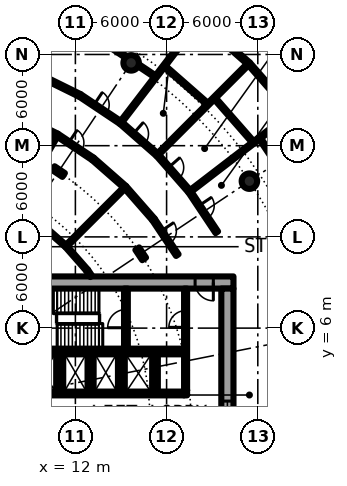
"""IFC4 building model, lengths in metres.
Left out: names, types, materials, properties, quantities, classifications, styles, units other than length and angle.
Written with IfcOpenShell. Run it as: python <this file> out.ifc"""

import sys

from ifc_helpers import new_model, si_unit, direction, frame, frame_2d, origin, origin_2d, place, context, subcontext, project, spatial, rectangle, hollow_circle, i_section, extrude, element, fill, save


model = new_model("IFC4")
c1 = context("Model", 3, precision=1e-05, world=origin(), true_north=direction((0.0, 1.0)))
c2 = subcontext(c1, "Body", "Model", "MODEL_VIEW")
j1 = project(units=[si_unit("LENGTHUNIT", "METRE"), si_unit("PLANEANGLEUNIT", "RADIAN")], contexts=[c1])
p1 = place(None, origin())
s1 = spatial("IfcSite", under=j1, at=p1, CompositionType="ELEMENT")
p2 = place(p1, origin())
s2 = spatial("IfcBuilding", under=s1, at=p2, CompositionType="ELEMENT")
p3 = place(p2, frame((0.0, 0.0, 5.4)))
s3 = spatial("IfcBuildingStorey", under=s2, at=p3, CompositionType="ELEMENT", Elevation=5.4)
for number, where, z_axis, x_axis in (
    (1, (23.448, 15.667, 0.0), (0.0, 0.0, 1.0), (1.0, 0.0, 0.0)),
    (2, (15.667, 23.448, 0.0), (0.0, 0.0, 1.0), (1.0, 0.0, 0.0)),
):
    element("IfcColumn", number, at=place(p3, frame(where, z_axis=z_axis, x_axis=x_axis)), inside=s3, PredefinedType="COLUMN", context=c2, shape_type="SweptSolid", body=[
        extrude(hollow_circle(Radius=0.508, WallThickness=0.05, at=origin_2d()), origin(), (0.0, 0.0, 1.0), 4.2),
    ])
for number, where, z_axis, x_axis in (
    (3, (16.297, 10.889, 0.0), (0.0, 0.0, 1.0), (0.831, 0.556, 0.0)),
    (4, (10.889, 16.297, 0.0), (0.0, 0.0, 1.0), (0.556, 0.831, 0.0)),
):
    element("IfcColumn", number, at=place(p3, frame(where, z_axis=z_axis, x_axis=x_axis)), inside=s3, PredefinedType="COLUMN", context=c2, shape_type="SweptSolid", body=[
        extrude(i_section(OverallWidth=0.303, OverallDepth=0.814, WebThickness=0.021, FlangeThickness=0.04, FilletRadius=0.03, at=origin_2d()), origin(), (0.0, 0.0, 1.0), 4.2),
    ])
p4 = place(p3, frame((22.4, 9.0, 0.0), z_axis=(0.0, 0.0, 1.0), x_axis=(-1.0, 0.0, 0.0)))
e5 = element("IfcWall", 5, at=p4, inside=s3, PredefinedType="SHEAR", context=c2, shape_type="SweptSolid", body=[
    extrude(rectangle(XDim=14.2, YDim=0.8, at=frame_2d((7.1, 0.0))), origin(), (0.0, 0.0, 1.0), 4.2),
])
p5 = place(p4, frame((1.325, 0.0, 0.0)))
e6 = element("IfcOpeningElement", 6, at=p5, cuts=e5, PredefinedType="OPENING", context=c2, shape_type="SweptSolid", body=[
    extrude(rectangle(XDim=1.2, YDim=2.3, at=frame_2d((0.6, 1.15))), frame((0.0, 0.41, 0.0), z_axis=(0.0, -1.0, 0.0), x_axis=(1.0, 0.0, 0.0)), (0.0, 0.0, 1.0), 0.82),
])
p6 = place(p3, frame((22.0, -8.6, 0.0), z_axis=(0.0, 0.0, 1.0), x_axis=(0.0, 1.0, 0.0)))
e7 = element("IfcWall", 7, at=p6, inside=s3, PredefinedType="SHEAR", context=c2, shape_type="SweptSolid", body=[
    extrude(rectangle(XDim=17.2, YDim=0.8, at=frame_2d((8.6, 0.0))), origin(), (0.0, 0.0, 1.0), 4.2),
])
p7 = place(p6, frame((7.4, 0.0, 0.1)))
e8 = element("IfcOpeningElement", 8, at=p7, cuts=e7, PredefinedType="OPENING", context=c2, shape_type="SweptSolid", body=[
    extrude(rectangle(XDim=2.4, YDim=2.2, at=frame_2d((1.2, 1.1))), frame((0.0, 0.41, 0.0), z_axis=(0.0, -1.0, 0.0), x_axis=(1.0, 0.0, 0.0)), (0.0, 0.0, 1.0), 0.82),
])
p8 = place(p3, frame((9.0, 1.7, 0.0), z_axis=(0.0, 0.0, 1.0), x_axis=(1.0, 0.0, 0.0)))
e9 = element("IfcWall", 9, at=p8, inside=s3, PredefinedType="SHEAR", context=c2, shape_type="SweptSolid", body=[
    extrude(rectangle(XDim=10.15, YDim=0.25, at=frame_2d((5.075, 0.0))), origin(), (0.0, 0.0, 1.0), 4.2),
])
p9 = place(p8, frame((0.387, 0.0, 0.0)))
e10 = element("IfcOpeningElement", 10, at=p9, cuts=e9, PredefinedType="OPENING", context=c2, shape_type="SweptSolid", body=[
    extrude(rectangle(XDim=1.1, YDim=2.3, at=frame_2d((0.55, 1.15))), frame((0.0, 0.135, 0.0), z_axis=(0.0, -1.0, 0.0), x_axis=(1.0, 0.0, 0.0)), (0.0, 0.0, 1.0), 0.27),
])
p10 = place(p8, frame((2.45, 0.0, 0.0)))
e11 = element("IfcOpeningElement", 11, at=p10, cuts=e9, PredefinedType="OPENING", context=c2, shape_type="SweptSolid", body=[
    extrude(rectangle(XDim=1.1, YDim=2.3, at=frame_2d((0.55, 1.15))), frame((0.0, 0.135, 0.0), z_axis=(0.0, -1.0, 0.0), x_axis=(1.0, 0.0, 0.0)), (0.0, 0.0, 1.0), 0.27),
])
p11 = place(p8, frame((4.45, 0.0, 0.0)))
e12 = element("IfcOpeningElement", 12, at=p11, cuts=e9, PredefinedType="OPENING", context=c2, shape_type="SweptSolid", body=[
    extrude(rectangle(XDim=1.1, YDim=2.3, at=frame_2d((0.55, 1.15))), frame((0.0, 0.135, 0.0), z_axis=(0.0, -1.0, 0.0), x_axis=(1.0, 0.0, 0.0)), (0.0, 0.0, 1.0), 0.27),
])
p12 = place(p3, frame((9.0, 4.462, 0.0), z_axis=(0.0, 0.0, 1.0), x_axis=(1.0, 0.0, 0.0)))
e13 = element("IfcWall", 13, at=p12, inside=s3, PredefinedType="SHEAR", context=c2, shape_type="SweptSolid", body=[
    extrude(rectangle(XDim=10.15, YDim=0.375, at=frame_2d((5.075, 0.0))), origin(), (0.0, 0.0, 1.0), 4.2),
])
p13 = place(p12, frame((6.6, 0.0, 0.0)))
e14 = element("IfcOpeningElement", 14, at=p13, cuts=e13, PredefinedType="OPENING", context=c2, shape_type="SweptSolid", body=[
    extrude(rectangle(XDim=1.1, YDim=2.3, at=frame_2d((0.55, 1.15))), frame((0.0, 0.198, 0.0), z_axis=(0.0, -1.0, 0.0), x_axis=(1.0, 0.0, 0.0)), (0.0, 0.0, 1.0), 0.395),
])
p14 = place(p3, frame((15.325, 4.65, 0.0), z_axis=(0.0, 0.0, 1.0), x_axis=(0.0, 1.0, 0.0)))
e15 = element("IfcWall", 15, at=p14, inside=s3, PredefinedType="SHEAR", context=c2, shape_type="SweptSolid", body=[
    extrude(rectangle(XDim=3.95, YDim=0.25, at=frame_2d((1.975, 0.0))), origin(), (0.0, 0.0, 1.0), 4.2),
])
p15 = place(p14, frame((1.375, 0.0, 0.0)))
e16 = element("IfcOpeningElement", 16, at=p15, cuts=e15, PredefinedType="OPENING", context=c2, shape_type="SweptSolid", body=[
    extrude(rectangle(XDim=1.2, YDim=2.3, at=frame_2d((0.6, 1.15))), frame((0.0, 0.135, 0.0), z_axis=(0.0, -1.0, 0.0), x_axis=(1.0, 0.0, 0.0)), (0.0, 0.0, 1.0), 0.27),
])
for number, where, z_axis, x_axis in (
    (17, (15.0, 1.825, 0.0), (0.0, 0.0, 1.0), (0.0, 1.0, 0.0)),
    (18, (17.3, 1.825, 0.0), (0.0, 0.0, 1.0), (0.0, 1.0, 0.0)),
):
    element("IfcWall", number, at=place(p3, frame(where, z_axis=z_axis, x_axis=x_axis)), inside=s3, PredefinedType="SOLIDWALL", context=c2, shape_type="SweptSolid", body=[
        extrude(rectangle(XDim=2.45, YDim=0.25, at=frame_2d((1.225, 0.0))), origin(), (0.0, 0.0, 1.0), 3.7),
    ])
p16 = place(p3, frame((19.25, 1.575, 0.0), z_axis=(0.0, 0.0, 1.0), x_axis=(0.0, 1.0, 0.0)))
e19 = element("IfcWall", 19, at=p16, inside=s3, PredefinedType="SOLIDWALL", context=c2, shape_type="SweptSolid", body=[
    extrude(rectangle(XDim=7.025, YDim=0.2, at=frame_2d((3.513, 0.0))), origin(), (0.0, 0.0, 1.0), 3.7),
])
p17 = place(p16, frame((4.475, 0.0, 0.0)))
e20 = element("IfcOpeningElement", 20, at=p17, cuts=e19, PredefinedType="OPENING", context=c2, shape_type="SweptSolid", body=[
    extrude(rectangle(XDim=1.1, YDim=2.3, at=frame_2d((0.55, 1.15))), frame((0.0, 0.11, 0.0), z_axis=(0.0, -1.0, 0.0), x_axis=(1.0, 0.0, 0.0)), (0.0, 0.0, 1.0), 0.22),
])
for number, where, z_axis, x_axis in (
    (21, (11.0, 1.825, 0.0), (0.0, 0.0, 1.0), (0.0, 1.0, 0.0)),
    (22, (13.0, 1.825, 0.0), (0.0, 0.0, 1.0), (0.0, 1.0, 0.0)),
):
    element("IfcWall", number, at=place(p3, frame(where, z_axis=z_axis, x_axis=x_axis)), inside=s3, PredefinedType="SOLIDWALL", context=c2, shape_type="SweptSolid", body=[
        extrude(rectangle(XDim=2.45, YDim=0.25, at=frame_2d((1.225, 0.0))), origin(), (0.0, 0.0, 1.0), 3.7),
    ])
p18 = place(p3, frame((8.051, 13.942, 0.0), z_axis=(0.0, 0.0, 1.0), x_axis=(0.499996545922, 0.866027397988, 0.0)))
e23 = element("IfcWall", 23, at=p18, inside=s3, PredefinedType="PARTITIONING", context=c2, shape_type="SweptSolid", body=[
    extrude(rectangle(XDim=5.5, YDim=0.15, at=frame_2d((2.75, 0.0))), origin(), (0.0, 0.0, 1.0), 3.7),
])
p19 = place(p3, frame((9.414, 22.727, 0.0), z_axis=(0.0, 0.0, 1.0), x_axis=(0.38259533032, 0.923916020652, 0.0)))
e24 = element("IfcWall", 24, at=p19, inside=s3, PredefinedType="PARTITIONING", context=c2, shape_type="SweptSolid", body=[
    extrude(rectangle(XDim=8.5, YDim=0.15, at=frame_2d((4.25, 0.0))), origin(), (0.0, 0.0, 1.0), 3.7),
])
p20 = place(p3, frame((11.384, 11.384, 0.0), z_axis=(0.0, 0.0, 1.0), x_axis=(0.707106781187, 0.707106781187, 0.0)))
e25 = element("IfcWall", 25, at=p20, inside=s3, PredefinedType="PARTITIONING", context=c2, shape_type="SweptSolid", body=[
    extrude(rectangle(XDim=5.501, YDim=0.15, at=frame_2d((2.75, 0.0))), origin(), (0.0, 0.0, 1.0), 3.7),
])
p21 = place(p3, frame((14.976, 19.516, 0.0), z_axis=(0.0, 0.0, 1.0), x_axis=(0.608691402198, 0.793407068843, 0.0)))
e26 = element("IfcWall", 26, at=p21, inside=s3, PredefinedType="PARTITIONING", context=c2, shape_type="SweptSolid", body=[
    extrude(rectangle(XDim=8.5, YDim=0.15, at=frame_2d((4.25, 0.0))), origin(), (0.0, 0.0, 1.0), 3.7),
])
p22 = place(p3, frame((17.395, 17.395, 0.0), z_axis=(0.0, 0.0, 1.0), x_axis=(0.707106781187, 0.707106781187, 0.0)))
e27 = element("IfcWall", 27, at=p22, inside=s3, PredefinedType="PARTITIONING", context=c2, shape_type="SweptSolid", body=[
    extrude(rectangle(XDim=8.5, YDim=0.15, at=frame_2d((4.25, 0.0))), origin(), (0.0, 0.0, 1.0), 3.7),
])
p23 = place(p3, frame((19.517, 14.975, 0.0), z_axis=(0.0, 0.0, 1.0), x_axis=(0.793309003466, 0.608819205528, 0.0)))
e28 = element("IfcWall", 28, at=p23, inside=s3, PredefinedType="PARTITIONING", context=c2, shape_type="SweptSolid", body=[
    extrude(rectangle(XDim=8.5, YDim=0.15, at=frame_2d((4.25, 0.0))), origin(), (0.0, 0.0, 1.0), 3.7),
])
for number, where, z_axis, x_axis in (
    (29, (9.801, 12.773, 0.0), (0.0, 0.0, 1.0), (0.752, -0.66, 0.0)),
    (30, (11.384, 11.384, 0.0), (0.0, 0.0, 1.0), (0.66, -0.752, 0.0)),
):
    element("IfcWall", number, at=place(p3, frame(where, z_axis=z_axis, x_axis=x_axis)), inside=s3, PredefinedType="PARTITIONING", context=c2, shape_type="SweptSolid", body=[
        extrude(rectangle(XDim=2.106, YDim=0.15, at=frame_2d((1.053, 0.0))), origin(), (0.0, 0.0, 1.0), 3.7),
    ])
p24 = place(p3, frame((12.773, 9.801, 0.0), z_axis=(0.0, 0.0, 1.0), x_axis=(0.555634077892, -0.831426948977, 0.0)))
e31 = element("IfcWall", 31, at=p24, inside=s3, PredefinedType="PARTITIONING", context=c2, shape_type="SweptSolid", body=[
    extrude(rectangle(XDim=0.482, YDim=0.15, at=frame_2d((0.241, 0.0))), origin(), (0.0, 0.0, 1.0), 3.7),
])
p25 = place(p3, frame((8.266, 19.956, 0.0), z_axis=(0.0, 0.0, 1.0), x_axis=(0.896816398134, -0.442402924988, 0.0)))
e32 = element("IfcWall", 32, at=p25, inside=s3, PredefinedType="PARTITIONING", context=c2, shape_type="SweptSolid", body=[
    extrude(rectangle(XDim=2.825, YDim=0.2, at=frame_2d((1.413, 0.0))), origin(), (0.0, 0.0, 1.0), 3.7),
])
p26 = place(p3, frame((10.8, 18.706, 0.0), z_axis=(0.0, 0.0, 1.0), x_axis=(0.831371669473, -0.55571678686, 0.0)))
e33 = element("IfcWall", 33, at=p26, inside=s3, PredefinedType="PARTITIONING", context=c2, shape_type="SweptSolid", body=[
    extrude(rectangle(XDim=2.825, YDim=0.2, at=frame_2d((1.413, 0.0))), origin(), (0.0, 0.0, 1.0), 3.7),
])
p27 = place(p26, frame((0.913, 0.0, 0.0)))
e34 = element("IfcOpeningElement", 34, at=p27, cuts=e33, PredefinedType="OPENING", context=c2, shape_type="SweptSolid", body=[
    extrude(rectangle(XDim=1.0, YDim=2.3, at=frame_2d((0.5, 1.15))), frame((0.0, 0.11, 0.0), z_axis=(0.0, -1.0, 0.0), x_axis=(1.0, 0.0, 0.0)), (0.0, 0.0, 1.0), 0.22),
])
for number, where, z_axis, x_axis in (
    (35, (13.149, 17.136, 0.0), (0.0, 0.0, 1.0), (0.752, -0.659, 0.0)),
    (36, (15.274, 15.274, 0.0), (0.0, 0.0, 1.0), (0.659, -0.752, 0.0)),
):
    element("IfcWall", number, at=place(p3, frame(where, z_axis=z_axis, x_axis=x_axis)), inside=s3, PredefinedType="PARTITIONING", context=c2, shape_type="SweptSolid", body=[
        extrude(rectangle(XDim=2.825, YDim=0.2, at=frame_2d((1.413, 0.0))), origin(), (0.0, 0.0, 1.0), 3.7),
    ])
p28 = place(p3, frame((17.136, 13.149, 0.0), z_axis=(0.0, 0.0, 1.0), x_axis=(0.55571678686, -0.831371669473, 0.0)))
e37 = element("IfcWall", 37, at=p28, inside=s3, PredefinedType="PARTITIONING", context=c2, shape_type="SweptSolid", body=[
    extrude(rectangle(XDim=2.825, YDim=0.2, at=frame_2d((1.413, 0.0))), origin(), (0.0, 0.0, 1.0), 3.7),
])
p29 = place(p28, frame((0.913, 0.0, 0.0)))
e38 = element("IfcOpeningElement", 38, at=p29, cuts=e37, PredefinedType="OPENING", context=c2, shape_type="SweptSolid", body=[
    extrude(rectangle(XDim=1.0, YDim=2.3, at=frame_2d((0.5, 1.15))), frame((0.0, 0.11, 0.0), z_axis=(0.0, -1.0, 0.0), x_axis=(1.0, 0.0, 0.0)), (0.0, 0.0, 1.0), 0.22),
])
p30 = place(p3, frame((9.414, 22.727, 0.0), z_axis=(0.0, 0.0, 1.0), x_axis=(0.896886949195, -0.442259878763, 0.0)))
e39 = element("IfcWall", 39, at=p30, inside=s3, PredefinedType="PARTITIONING", context=c2, shape_type="SweptSolid", body=[
    extrude(rectangle(XDim=3.218, YDim=0.2, at=frame_2d((1.609, 0.0))), origin(), (0.0, 0.0, 1.0), 3.7),
])
p31 = place(p3, frame((12.3, 21.304, 0.0), z_axis=(0.0, 0.0, 1.0), x_axis=(0.831501361433, -0.555522714148, 0.0)))
e40 = element("IfcWall", 40, at=p31, inside=s3, PredefinedType="PARTITIONING", context=c2, shape_type="SweptSolid", body=[
    extrude(rectangle(XDim=3.218, YDim=0.2, at=frame_2d((1.609, 0.0))), origin(), (0.0, 0.0, 1.0), 3.7),
])
p32 = place(p31, frame((1.109, 0.0, 0.0)))
e41 = element("IfcOpeningElement", 41, at=p32, cuts=e40, PredefinedType="OPENING", context=c2, shape_type="SweptSolid", body=[
    extrude(rectangle(XDim=1.0, YDim=2.3, at=frame_2d((0.5, 1.15))), frame((0.0, 0.11, 0.0), z_axis=(0.0, -1.0, 0.0), x_axis=(1.0, 0.0, 0.0)), (0.0, 0.0, 1.0), 0.22),
])
p33 = place(p3, frame((14.976, 19.516, 0.0), z_axis=(0.0, 0.0, 1.0), x_axis=(0.751880539175, -0.659299366608, 0.0)))
e42 = element("IfcWall", 42, at=p33, inside=s3, PredefinedType="PARTITIONING", context=c2, shape_type="SweptSolid", body=[
    extrude(rectangle(XDim=3.217, YDim=0.2, at=frame_2d((1.609, 0.0))), origin(), (0.0, 0.0, 1.0), 3.7),
])
p34 = place(p33, frame((1.109, 0.0, 0.0)))
e43 = element("IfcOpeningElement", 43, at=p34, cuts=e42, PredefinedType="OPENING", context=c2, shape_type="SweptSolid", body=[
    extrude(rectangle(XDim=1.0, YDim=2.3, at=frame_2d((0.5, 1.15))), frame((0.0, 0.11, 0.0), z_axis=(0.0, -1.0, 0.0), x_axis=(1.0, 0.0, 0.0)), (0.0, 0.0, 1.0), 0.22),
])
p35 = place(p3, frame((17.395, 17.395, 0.0), z_axis=(0.0, 0.0, 1.0), x_axis=(0.659299366608, -0.751880539175, 0.0)))
e44 = element("IfcWall", 44, at=p35, inside=s3, PredefinedType="PARTITIONING", context=c2, shape_type="SweptSolid", body=[
    extrude(rectangle(XDim=3.217, YDim=0.2, at=frame_2d((1.609, 0.0))), origin(), (0.0, 0.0, 1.0), 3.7),
])
p36 = place(p35, frame((1.109, 0.0, 0.0)))
e45 = element("IfcOpeningElement", 45, at=p36, cuts=e44, PredefinedType="OPENING", context=c2, shape_type="SweptSolid", body=[
    extrude(rectangle(XDim=1.0, YDim=2.3, at=frame_2d((0.5, 1.15))), frame((0.0, 0.11, 0.0), z_axis=(0.0, -1.0, 0.0), x_axis=(1.0, 0.0, 0.0)), (0.0, 0.0, 1.0), 0.22),
])
p37 = place(p3, frame((19.516, 14.976, 0.0), z_axis=(0.0, 0.0, 1.0), x_axis=(0.555522714148, -0.831501361433, 0.0)))
e46 = element("IfcWall", 46, at=p37, inside=s3, PredefinedType="PARTITIONING", context=c2, shape_type="SweptSolid", body=[
    extrude(rectangle(XDim=3.218, YDim=0.2, at=frame_2d((1.609, 0.0))), origin(), (0.0, 0.0, 1.0), 3.7),
])
p38 = place(p37, frame((1.109, 0.0, 0.0)))
e47 = element("IfcOpeningElement", 47, at=p38, cuts=e46, PredefinedType="OPENING", context=c2, shape_type="SweptSolid", body=[
    extrude(rectangle(XDim=1.0, YDim=2.3, at=frame_2d((0.5, 1.15))), frame((0.0, 0.11, 0.0), z_axis=(0.0, -1.0, 0.0), x_axis=(1.0, 0.0, 0.0)), (0.0, 0.0, 1.0), 0.22),
])
for number, where, z_axis, x_axis in (
    (48, (14.2, 24.595, 0.0), (0.0, 0.0, 1.0), (0.832, -0.555, 0.0)),
    (49, (16.145, 23.295, 0.0), (0.0, 0.0, 1.0), (0.832, -0.555, 0.0)),
):
    element("IfcWall", number, at=place(p3, frame(where, z_axis=z_axis, x_axis=x_axis)), inside=s3, PredefinedType="PARTITIONING", context=c2, shape_type="SweptSolid", body=[
        extrude(rectangle(XDim=1.376, YDim=0.15, at=frame_2d((0.688, 0.0))), origin(), (0.0, 0.0, 1.0), 3.7),
    ])
p39 = place(p3, frame((17.837, 23.245, 0.0), z_axis=(0.0, 0.0, 1.0), x_axis=(0.751782936662, -0.659410658197, 0.0)))
e50 = element("IfcWall", 50, at=p39, inside=s3, PredefinedType="PARTITIONING", context=c2, shape_type="SweptSolid", body=[
    extrude(rectangle(XDim=3.832, YDim=0.15, at=frame_2d((1.916, 0.0))), origin(), (0.0, 0.0, 1.0), 3.7),
])
p40 = place(p3, frame((21.142, 21.142, 0.0), z_axis=(0.0, 0.0, 1.0), x_axis=(0.659401300363, -0.751791144587, 0.0)))
e51 = element("IfcWall", 51, at=p40, inside=s3, PredefinedType="PARTITIONING", context=c2, shape_type="SweptSolid", body=[
    extrude(rectangle(XDim=3.911, YDim=0.15, at=frame_2d((1.956, 0.0))), origin(), (0.0, 0.0, 1.0), 3.7),
])
p41 = place(p3, frame((24.118, 18.506, 0.0), z_axis=(0.0, 0.0, 1.0), x_axis=(0.555550064902, -0.831483087854, 0.0)))
e52 = element("IfcWall", 52, at=p41, inside=s3, PredefinedType="PARTITIONING", context=c2, shape_type="SweptSolid", body=[
    extrude(rectangle(XDim=3.976, YDim=0.15, at=frame_2d((1.988, 0.0))), origin(), (0.0, 0.0, 1.0), 3.7),
])
p42 = place(p3, frame((20.15, 26.26, 0.0), z_axis=(0.0, 0.0, 1.0), x_axis=(0.75180422834, -0.659386383125, 0.0)))
e53 = element("IfcWall", 53, at=p42, inside=s3, PredefinedType="PARTITIONING", context=c2, shape_type="SweptSolid", body=[
    extrude(rectangle(XDim=4.33, YDim=0.2, at=frame_2d((2.165, 0.0))), origin(), (0.0, 0.0, 1.0), 3.7),
])
p43 = place(p42, frame((1.665, 0.0, 0.0)))
e54 = element("IfcOpeningElement", 54, at=p43, cuts=e53, PredefinedType="OPENING", context=c2, shape_type="SweptSolid", body=[
    extrude(rectangle(XDim=1.0, YDim=2.3, at=frame_2d((0.5, 1.15))), frame((0.0, 0.11, 0.0), z_axis=(0.0, -1.0, 0.0), x_axis=(1.0, 0.0, 0.0)), (0.0, 0.0, 1.0), 0.22),
])
p44 = place(p3, frame((23.405, 23.405, 0.0), z_axis=(0.0, 0.0, 1.0), x_axis=(0.659386383125, -0.75180422834, 0.0)))
e55 = element("IfcWall", 55, at=p44, inside=s3, PredefinedType="PARTITIONING", context=c2, shape_type="SweptSolid", body=[
    extrude(rectangle(XDim=4.33, YDim=0.2, at=frame_2d((2.165, 0.0))), origin(), (0.0, 0.0, 1.0), 3.7),
])
p45 = place(p44, frame((1.665, 0.0, 0.0)))
e56 = element("IfcOpeningElement", 56, at=p45, cuts=e55, PredefinedType="OPENING", context=c2, shape_type="SweptSolid", body=[
    extrude(rectangle(XDim=1.0, YDim=2.3, at=frame_2d((0.5, 1.15))), frame((0.0, 0.11, 0.0), z_axis=(0.0, -1.0, 0.0), x_axis=(1.0, 0.0, 0.0)), (0.0, 0.0, 1.0), 0.22),
])
p46 = place(p9, origin())
e57 = element("IfcDoor", 57, at=p46, inside=s3, OperationType="DOUBLE_DOOR_SLIDING", PredefinedType="DOOR", context=c2, shape_type="SweptSolid", body=[
    extrude(rectangle(XDim=1.1, YDim=2.3, at=frame_2d((0.55, 1.15))), frame((0.0, 0.025, 0.0), z_axis=(0.0, -1.0, 0.0), x_axis=(1.0, 0.0, 0.0)), (0.0, 0.0, 1.0), 0.05),
])
fill(e10, e57)
p47 = place(p10, origin())
e58 = element("IfcDoor", 58, at=p47, inside=s3, OperationType="DOUBLE_DOOR_SLIDING", PredefinedType="DOOR", context=c2, shape_type="SweptSolid", body=[
    extrude(rectangle(XDim=1.1, YDim=2.3, at=frame_2d((0.55, 1.15))), frame((0.0, 0.025, 0.0), z_axis=(0.0, -1.0, 0.0), x_axis=(1.0, 0.0, 0.0)), (0.0, 0.0, 1.0), 0.05),
])
fill(e11, e58)
p48 = place(p11, origin())
e59 = element("IfcDoor", 59, at=p48, inside=s3, OperationType="DOUBLE_DOOR_SLIDING", PredefinedType="DOOR", context=c2, shape_type="SweptSolid", body=[
    extrude(rectangle(XDim=1.1, YDim=2.3, at=frame_2d((0.55, 1.15))), frame((0.0, 0.025, 0.0), z_axis=(0.0, -1.0, 0.0), x_axis=(1.0, 0.0, 0.0)), (0.0, 0.0, 1.0), 0.05),
])
fill(e12, e59)
p49 = place(p13, origin())
e60 = element("IfcDoor", 60, at=p49, inside=s3, OperationType="DOUBLE_DOOR_SLIDING", PredefinedType="DOOR", context=c2, shape_type="SweptSolid", body=[
    extrude(rectangle(XDim=1.1, YDim=2.3, at=frame_2d((0.55, 1.15))), frame((0.0, 0.025, 0.0), z_axis=(0.0, -1.0, 0.0), x_axis=(1.0, 0.0, 0.0)), (0.0, 0.0, 1.0), 0.05),
])
fill(e14, e60)
p50 = place(p15, origin())
e61 = element("IfcDoor", 61, at=p50, inside=s3, OperationType="SINGLE_SWING_LEFT", PredefinedType="DOOR", context=c2, shape_type="SweptSolid", body=[
    extrude(rectangle(XDim=1.2, YDim=2.3, at=frame_2d((0.6, 1.15))), frame((0.0, 0.025, 0.0), z_axis=(0.0, -1.0, 0.0), x_axis=(1.0, 0.0, 0.0)), (0.0, 0.0, 1.0), 0.05),
])
fill(e16, e61)
p51 = place(p17, origin())
e62 = element("IfcDoor", 62, at=p51, inside=s3, OperationType="SINGLE_SWING_LEFT", PredefinedType="DOOR", context=c2, shape_type="SweptSolid", body=[
    extrude(rectangle(XDim=1.1, YDim=2.3, at=frame_2d((0.55, 1.15))), frame((0.0, 0.025, 0.0), z_axis=(0.0, -1.0, 0.0), x_axis=(1.0, 0.0, 0.0)), (0.0, 0.0, 1.0), 0.05),
])
fill(e20, e62)
p52 = place(p5, origin())
e63 = element("IfcDoor", 63, at=p52, inside=s3, OperationType="SINGLE_SWING_RIGHT", PredefinedType="DOOR", context=c2, shape_type="SweptSolid", body=[
    extrude(rectangle(XDim=1.2, YDim=2.3, at=frame_2d((0.6, 1.15))), frame((0.0, 0.025, 0.0), z_axis=(0.0, -1.0, 0.0), x_axis=(1.0, 0.0, 0.0)), (0.0, 0.0, 1.0), 0.05),
])
fill(e6, e63)
p53 = place(p7, origin())
e64 = element("IfcWindow", 64, at=p53, inside=s3, PartitioningType="SINGLE_PANEL", PredefinedType="WINDOW", context=c2, shape_type="SweptSolid", body=[
    extrude(rectangle(XDim=2.4, YDim=2.2, at=frame_2d((1.2, 1.1))), frame((0.0, 0.03, 0.0), z_axis=(0.0, -1.0, 0.0), x_axis=(1.0, 0.0, 0.0)), (0.0, 0.0, 1.0), 0.06),
])
fill(e8, e64)
p54 = place(p29, origin())
e65 = element("IfcDoor", 65, at=p54, inside=s3, OperationType="SINGLE_SWING_LEFT", PredefinedType="DOOR", context=c2, shape_type="SweptSolid", body=[
    extrude(rectangle(XDim=1.0, YDim=2.3, at=frame_2d((0.5, 1.15))), frame((0.0, 0.025, 0.0), z_axis=(0.0, -1.0, 0.0), x_axis=(1.0, 0.0, 0.0)), (0.0, 0.0, 1.0), 0.05),
])
fill(e38, e65)
p55 = place(p27, origin())
e66 = element("IfcDoor", 66, at=p55, inside=s3, OperationType="SINGLE_SWING_LEFT", PredefinedType="DOOR", context=c2, shape_type="SweptSolid", body=[
    extrude(rectangle(XDim=1.0, YDim=2.3, at=frame_2d((0.5, 1.15))), frame((0.0, 0.025, 0.0), z_axis=(0.0, -1.0, 0.0), x_axis=(1.0, 0.0, 0.0)), (0.0, 0.0, 1.0), 0.05),
])
fill(e34, e66)
p56 = place(p38, origin())
e67 = element("IfcDoor", 67, at=p56, inside=s3, OperationType="SINGLE_SWING_RIGHT", PredefinedType="DOOR", context=c2, shape_type="SweptSolid", body=[
    extrude(rectangle(XDim=1.0, YDim=2.3, at=frame_2d((0.5, 1.15))), frame((0.0, 0.025, 0.0), z_axis=(0.0, -1.0, 0.0), x_axis=(1.0, 0.0, 0.0)), (0.0, 0.0, 1.0), 0.05),
])
fill(e47, e67)
p57 = place(p36, origin())
e68 = element("IfcDoor", 68, at=p57, inside=s3, OperationType="SINGLE_SWING_LEFT", PredefinedType="DOOR", context=c2, shape_type="SweptSolid", body=[
    extrude(rectangle(XDim=1.0, YDim=2.3, at=frame_2d((0.5, 1.15))), frame((0.0, 0.025, 0.0), z_axis=(0.0, -1.0, 0.0), x_axis=(1.0, 0.0, 0.0)), (0.0, 0.0, 1.0), 0.05),
])
fill(e45, e68)
p58 = place(p45, origin())
e69 = element("IfcDoor", 69, at=p58, inside=s3, OperationType="SINGLE_SWING_LEFT", PredefinedType="DOOR", context=c2, shape_type="SweptSolid", body=[
    extrude(rectangle(XDim=1.0, YDim=2.3, at=frame_2d((0.5, 1.15))), frame((0.0, 0.025, 0.0), z_axis=(0.0, -1.0, 0.0), x_axis=(1.0, 0.0, 0.0)), (0.0, 0.0, 1.0), 0.05),
])
fill(e56, e69)
p59 = place(p34, origin())
e70 = element("IfcDoor", 70, at=p59, inside=s3, OperationType="SINGLE_SWING_RIGHT", PredefinedType="DOOR", context=c2, shape_type="SweptSolid", body=[
    extrude(rectangle(XDim=1.0, YDim=2.3, at=frame_2d((0.5, 1.15))), frame((0.0, 0.025, 0.0), z_axis=(0.0, -1.0, 0.0), x_axis=(1.0, 0.0, 0.0)), (0.0, 0.0, 1.0), 0.05),
])
fill(e43, e70)
p60 = place(p32, origin())
e71 = element("IfcDoor", 71, at=p60, inside=s3, OperationType="SINGLE_SWING_RIGHT", PredefinedType="DOOR", context=c2, shape_type="SweptSolid", body=[
    extrude(rectangle(XDim=1.0, YDim=2.3, at=frame_2d((0.5, 1.15))), frame((0.0, 0.025, 0.0), z_axis=(0.0, -1.0, 0.0), x_axis=(1.0, 0.0, 0.0)), (0.0, 0.0, 1.0), 0.05),
])
fill(e41, e71)
save(model, sys.argv[1])
